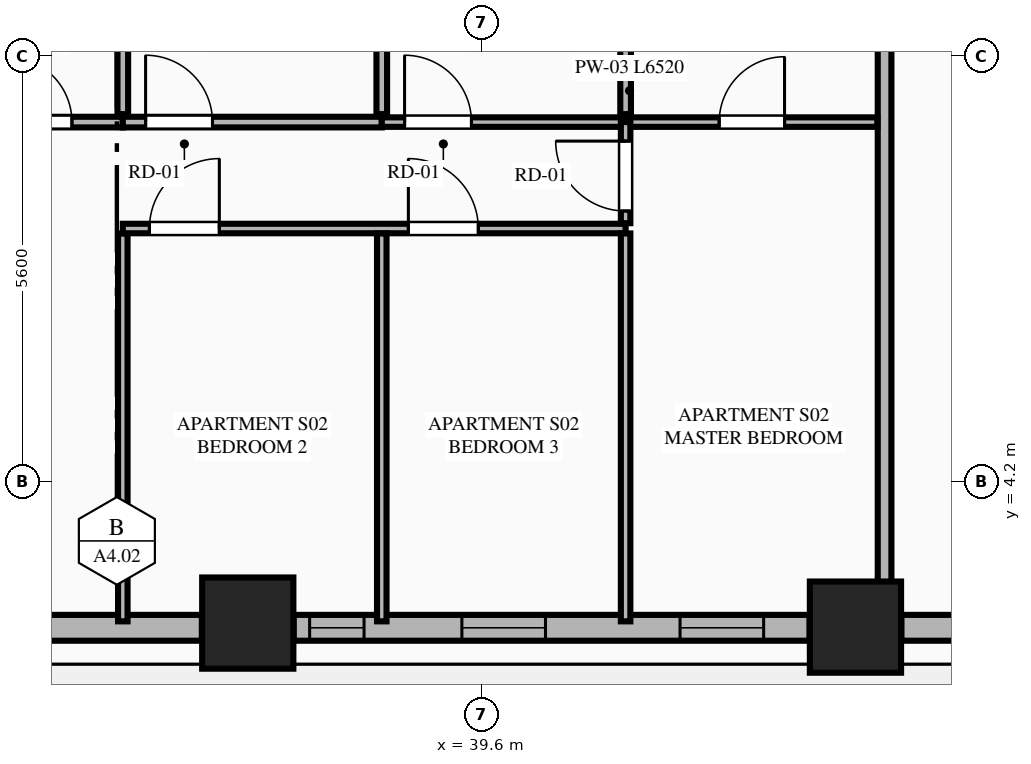
"""IFC4 building model, lengths in metres.
Left out: names, types, materials, properties, quantities, classifications, styles, units other than length and angle.
Written with IfcOpenShell. Run it as: python <this file> out.ifc"""

import sys

from ifc_helpers import new_model, si_unit, direction, frame, frame_2d, origin, origin_2d, place, context, subcontext, project, spatial, rectangle, extrude, element, fill, save


model = new_model("IFC4")
c1 = context("Model", 3, precision=1e-05, world=origin(), true_north=direction((0.0, 1.0)))
c2 = subcontext(c1, "Body", "Model", "MODEL_VIEW")
j1 = project(units=[si_unit("LENGTHUNIT", "METRE"), si_unit("PLANEANGLEUNIT", "RADIAN")], contexts=[c1])
p1 = place(None, origin())
s1 = spatial("IfcSite", under=j1, at=p1, CompositionType="ELEMENT")
p2 = place(p1, origin())
s2 = spatial("IfcBuilding", under=s1, at=p2, CompositionType="ELEMENT")
p3 = place(p2, frame((0.0, 0.0, 28.45)))
s3 = spatial("IfcBuildingStorey", under=s2, at=p3, CompositionType="ELEMENT", Elevation=28.45)
for number, where, z_axis, x_axis in (
    (1, (36.522, 2.342, 0.0), (0.0, 0.0, 1.0), (1.0, 0.0, 0.0)),
    (2, (44.517, 2.289, 0.0), (0.0, 0.0, 1.0), (1.0, 0.0, 0.0)),
):
    element("IfcColumn", number, at=place(p3, frame(where, z_axis=z_axis, x_axis=x_axis)), inside=s3, PredefinedType="COLUMN", context=c2, shape_type="SweptSolid", body=[
        extrude(rectangle(XDim=1.2, YDim=1.2, at=origin_2d()), origin(), (0.0, 0.0, 1.0), 3.55),
    ])
p4 = place(p3, frame((28.882, 2.28, 0.0), z_axis=(0.0, 0.0, 1.0), x_axis=(1.0, 0.0, 0.0)))
e3 = element("IfcWall", 3, at=p4, inside=s3, PredefinedType="STANDARD", context=c2, shape_type="SweptSolid", body=[
    extrude(rectangle(XDim=7.036, YDim=0.34, at=frame_2d((3.518, 0.0))), origin(), (0.0, 0.0, 1.0), 2.787),
])
p5 = place(p4, frame((2.397, 0.0, 0.0)))
e4 = element("IfcOpeningElement", 4, at=p5, cuts=e3, PredefinedType="OPENING", context=c2, shape_type="SweptSolid", body=[
    extrude(rectangle(XDim=1.1, YDim=2.25, at=frame_2d((0.55, 1.125))), frame((0.0, 0.18, 0.0), z_axis=(0.0, -1.0, 0.0), x_axis=(1.0, 0.0, 0.0)), (0.0, 0.0, 1.0), 0.36),
])
p6 = place(p3, frame((37.126, 2.28, 0.0), z_axis=(0.0, 0.0, 1.0), x_axis=(1.0, 0.0, 0.0)))
e5 = element("IfcWall", 5, at=p6, inside=s3, PredefinedType="STANDARD", context=c2, shape_type="SweptSolid", body=[
    extrude(rectangle(XDim=6.787, YDim=0.34, at=frame_2d((3.394, 0.0))), origin(), (0.0, 0.0, 1.0), 2.787),
])
p7 = place(p6, frame((2.213, 0.0, 0.75)))
e6 = element("IfcOpeningElement", 6, at=p7, cuts=e5, PredefinedType="OPENING", context=c2, shape_type="SweptSolid", body=[
    extrude(rectangle(XDim=1.1, YDim=1.887, at=frame_2d((0.55, 0.943))), frame((0.0, 0.18, 0.0), z_axis=(0.0, -1.0, 0.0), x_axis=(1.0, 0.0, 0.0)), (0.0, 0.0, 1.0), 0.36),
])
p8 = place(p6, frame((5.083, 0.0, 0.75)))
e7 = element("IfcOpeningElement", 7, at=p8, cuts=e5, PredefinedType="OPENING", context=c2, shape_type="SweptSolid", body=[
    extrude(rectangle(XDim=1.1, YDim=1.887, at=frame_2d((0.55, 0.943))), frame((0.0, 0.18, 0.0), z_axis=(0.0, -1.0, 0.0), x_axis=(1.0, 0.0, 0.0)), (0.0, 0.0, 1.0), 0.36),
])
p9 = place(p6, frame((0.21, 0.0, 0.75)))
e8 = element("IfcOpeningElement", 8, at=p9, cuts=e5, PredefinedType="OPENING", context=c2, shape_type="SweptSolid", body=[
    extrude(rectangle(XDim=0.716, YDim=1.887, at=frame_2d((0.358, 0.943))), frame((0.0, 0.18, 0.0), z_axis=(0.0, -1.0, 0.0), x_axis=(1.0, 0.0, 0.0)), (0.0, 0.0, 1.0), 0.36),
])
p10 = place(p3, frame((45.121, 2.28, 0.0), z_axis=(0.0, 0.0, 1.0), x_axis=(1.0, 0.0, 0.0)))
e9 = element("IfcWall", 9, at=p10, inside=s3, PredefinedType="STANDARD", context=c2, shape_type="SweptSolid", body=[
    extrude(rectangle(XDim=1.245, YDim=0.34, at=frame_2d((0.623, 0.0))), origin(), (0.0, 0.0, 1.0), 3.33),
])
p11 = place(p3, frame((44.9, 2.455, 0.0), z_axis=(0.0, 0.0, 1.0), x_axis=(0.0, 1.0, 0.0)))
e10 = element("IfcWall", 10, at=p11, inside=s3, PredefinedType="PARTITIONING", context=c2, shape_type="SweptSolid", body=[
    extrude(rectangle(XDim=13.495, YDim=0.18, at=frame_2d((6.748, 0.0))), origin(), (0.0, 0.0, 1.0), 3.33),
])
p12 = place(p3, frame((30.278, 8.933, 0.0), z_axis=(0.0, 0.0, 1.0), x_axis=(1.0, 0.0, 0.0)))
e11 = element("IfcWall", 11, at=p12, inside=s3, PredefinedType="PLUMBINGWALL", context=c2, shape_type="SweptSolid", body=[
    extrude(rectangle(XDim=4.6, YDim=0.14, at=frame_2d((2.3, 0.0))), origin(), (0.0, 0.0, 1.0), 3.33),
])
p13 = place(p12, frame((3.071, 0.0, 0.0)))
e12 = element("IfcOpeningElement", 12, at=p13, cuts=e11, PredefinedType="OPENING", context=c2, shape_type="SweptSolid", body=[
    extrude(rectangle(XDim=0.86, YDim=2.1, at=frame_2d((0.43, 1.05))), frame((0.0, 0.08, 0.0), z_axis=(0.0, -1.0, 0.0), x_axis=(1.0, 0.0, 0.0)), (0.0, 0.0, 1.0), 0.16),
])
p14 = place(p12, frame((0.26, 0.0, 0.0)))
e13 = element("IfcOpeningElement", 13, at=p14, cuts=e11, PredefinedType="OPENING", context=c2, shape_type="SweptSolid", body=[
    extrude(rectangle(XDim=0.88, YDim=2.15, at=frame_2d((0.44, 1.075))), frame((0.0, 0.08, 0.0), z_axis=(0.0, -1.0, 0.0), x_axis=(1.0, 0.0, 0.0)), (0.0, 0.0, 1.0), 0.16),
])
p15 = place(p3, frame((34.878, 8.933, 0.0), z_axis=(0.0, 0.0, 1.0), x_axis=(1.0, 0.0, 0.0)))
e14 = element("IfcWall", 14, at=p15, inside=s3, PredefinedType="PLUMBINGWALL", context=c2, shape_type="SweptSolid", body=[
    extrude(rectangle(XDim=3.407, YDim=0.14, at=frame_2d((1.704, 0.0))), origin(), (0.0, 0.0, 1.0), 3.33),
])
p16 = place(p15, frame((0.3, 0.0, 0.0)))
e15 = element("IfcOpeningElement", 15, at=p16, cuts=e14, PredefinedType="OPENING", context=c2, shape_type="SweptSolid", body=[
    extrude(rectangle(XDim=0.88, YDim=2.15, at=frame_2d((0.44, 1.075))), frame((0.0, 0.08, 0.0), z_axis=(0.0, -1.0, 0.0), x_axis=(1.0, 0.0, 0.0)), (0.0, 0.0, 1.0), 0.16),
])
p17 = place(p3, frame((38.285, 8.933, 0.0), z_axis=(0.0, 0.0, 1.0), x_axis=(1.0, 0.0, 0.0)))
e16 = element("IfcWall", 16, at=p17, inside=s3, PredefinedType="PARTITIONING", context=c2, shape_type="SweptSolid", body=[
    extrude(rectangle(XDim=6.52, YDim=0.125, at=frame_2d((3.26, 0.0))), origin(), (0.0, 0.0, 1.0), 3.33),
])
p18 = place(p17, frame((4.439, 0.0, 0.0)))
e17 = element("IfcOpeningElement", 17, at=p18, cuts=e16, PredefinedType="OPENING", context=c2, shape_type="SweptSolid", body=[
    extrude(rectangle(XDim=0.86, YDim=2.1, at=frame_2d((0.43, 1.05))), frame((0.0, 0.073, 0.0), z_axis=(0.0, -1.0, 0.0), x_axis=(1.0, 0.0, 0.0)), (0.0, 0.0, 1.0), 0.145),
])
p19 = place(p17, frame((0.3, 0.0, 0.0)))
e18 = element("IfcOpeningElement", 18, at=p19, cuts=e16, PredefinedType="OPENING", context=c2, shape_type="SweptSolid", body=[
    extrude(rectangle(XDim=0.88, YDim=2.15, at=frame_2d((0.44, 1.075))), frame((0.0, 0.073, 0.0), z_axis=(0.0, -1.0, 0.0), x_axis=(1.0, 0.0, 0.0)), (0.0, 0.0, 1.0), 0.145),
])
p20 = place(p3, frame((34.878, 2.365, 0.0), z_axis=(0.0, 0.0, 1.0), x_axis=(0.0, 1.0, 0.0)))
e19 = element("IfcWall", 19, at=p20, inside=s3, PredefinedType="PARTITIONING", context=c2, shape_type="SweptSolid", body=[
    extrude(rectangle(XDim=5.103, YDim=0.125, at=frame_2d((2.552, 0.0))), origin(), (0.0, 0.0, 1.0), 3.33),
])
p21 = place(p3, frame((34.878, 7.533, 0.0), z_axis=(0.0, 0.0, 1.0), x_axis=(1.0, 0.0, 0.0)))
e20 = element("IfcWall", 20, at=p21, inside=s3, PredefinedType="PARTITIONING", context=c2, shape_type="SweptSolid", body=[
    extrude(rectangle(XDim=6.615, YDim=0.125, at=frame_2d((3.308, 0.0))), origin(), (0.0, 0.0, 1.0), 3.33),
])
p22 = place(p21, frame((0.35, 0.0, 0.0)))
e21 = element("IfcOpeningElement", 21, at=p22, cuts=e20, PredefinedType="OPENING", context=c2, shape_type="SweptSolid", body=[
    extrude(rectangle(XDim=0.92, YDim=2.15, at=frame_2d((0.46, 1.075))), frame((0.0, 0.073, 0.0), z_axis=(0.0, -1.0, 0.0), x_axis=(1.0, 0.0, 0.0)), (0.0, 0.0, 1.0), 0.145),
])
p23 = place(p21, frame((3.757, 0.0, 0.0)))
e22 = element("IfcOpeningElement", 22, at=p23, cuts=e20, PredefinedType="OPENING", context=c2, shape_type="SweptSolid", body=[
    extrude(rectangle(XDim=0.92, YDim=2.15, at=frame_2d((0.46, 1.075))), frame((0.0, 0.073, 0.0), z_axis=(0.0, -1.0, 0.0), x_axis=(1.0, 0.0, 0.0)), (0.0, 0.0, 1.0), 0.145),
])
p24 = place(p3, frame((41.493, 7.603, 0.0), z_axis=(0.0, 0.0, 1.0), x_axis=(0.0, 1.0, 0.0)))
e23 = element("IfcWall", 23, at=p24, inside=s3, PredefinedType="PARTITIONING", context=c2, shape_type="SweptSolid", body=[
    extrude(rectangle(XDim=1.33, YDim=0.125, at=frame_2d((0.665, 0.0))), origin(), (0.0, 0.0, 1.0), 3.33),
])
p25 = place(p24, frame((0.16, 0.0, 0.0)))
e24 = element("IfcOpeningElement", 24, at=p25, cuts=e23, PredefinedType="OPENING", context=c2, shape_type="SweptSolid", body=[
    extrude(rectangle(XDim=0.92, YDim=2.15, at=frame_2d((0.46, 1.075))), frame((0.0, 0.073, 0.0), z_axis=(0.0, -1.0, 0.0), x_axis=(1.0, 0.0, 0.0)), (0.0, 0.0, 1.0), 0.145),
])
for number, where, z_axis, x_axis in (
    (25, (34.878, 9.038, 0.0), (0.0, 0.0, 1.0), (0.0, 1.0, 0.0)),
    (26, (38.285, 9.038, 0.0), (0.0, 0.0, 1.0), (0.0, 1.0, 0.0)),
):
    element("IfcWall", number, at=place(p3, frame(where, z_axis=z_axis, x_axis=x_axis)), inside=s3, PredefinedType="PLUMBINGWALL", context=c2, shape_type="SweptSolid", body=[
        extrude(rectangle(XDim=6.827, YDim=0.14, at=frame_2d((3.414, 0.0))), origin(), (0.0, 0.0, 1.0), 3.33),
    ])
for number, where, z_axis, x_axis in (
    (27, (38.285, 2.365, 0.0), (0.0, 0.0, 1.0), (0.0, 1.0, 0.0)),
    (28, (41.493, 2.365, 0.0), (0.0, 0.0, 1.0), (0.0, 1.0, 0.0)),
):
    element("IfcWall", number, at=place(p3, frame(where, z_axis=z_axis, x_axis=x_axis)), inside=s3, PredefinedType="PARTITIONING", context=c2, shape_type="SweptSolid", body=[
        extrude(rectangle(XDim=5.103, YDim=0.125, at=frame_2d((2.552, 0.0))), origin(), (0.0, 0.0, 1.0), 3.33),
    ])
p26 = place(p3, frame((41.493, 9.038, 0.0), z_axis=(0.0, 0.0, 1.0), x_axis=(0.0, 1.0, 0.0)))
e29 = element("IfcWall", 29, at=p26, inside=s3, PredefinedType="PLUMBINGWALL", context=c2, shape_type="SweptSolid", body=[
    extrude(rectangle(XDim=6.827, YDim=0.14, at=frame_2d((3.414, 0.0))), origin(), (0.0, 0.0, 1.0), 3.33),
])
p27 = place(p7, origin())
e30 = element("IfcWindow", 30, at=p27, inside=s3, PartitioningType="SINGLE_PANEL", PredefinedType="WINDOW", context=c2, shape_type="SweptSolid", body=[
    extrude(rectangle(XDim=1.1, YDim=1.887, at=frame_2d((0.55, 0.943))), frame((0.0, 0.03, 0.0), z_axis=(0.0, -1.0, 0.0), x_axis=(1.0, 0.0, 0.0)), (0.0, 0.0, 1.0), 0.06),
])
fill(e6, e30)
p28 = place(p13, origin())
e31 = element("IfcDoor", 31, at=p28, inside=s3, OperationType="SINGLE_SWING_LEFT", PredefinedType="DOOR", context=c2, shape_type="SweptSolid", body=[
    extrude(rectangle(XDim=0.86, YDim=2.1, at=frame_2d((0.43, 1.05))), frame((0.0, 0.025, 0.0), z_axis=(0.0, -1.0, 0.0), x_axis=(1.0, 0.0, 0.0)), (0.0, 0.0, 1.0), 0.05),
])
fill(e12, e31)
p29 = place(p18, origin())
e32 = element("IfcDoor", 32, at=p29, inside=s3, OperationType="SINGLE_SWING_RIGHT", PredefinedType="DOOR", context=c2, shape_type="SweptSolid", body=[
    extrude(rectangle(XDim=0.86, YDim=2.1, at=frame_2d((0.43, 1.05))), frame((0.0, 0.025, 0.0), z_axis=(0.0, -1.0, 0.0), x_axis=(1.0, 0.0, 0.0)), (0.0, 0.0, 1.0), 0.05),
])
fill(e17, e32)
p30 = place(p16, origin())
e33 = element("IfcDoor", 33, at=p30, inside=s3, OperationType="SINGLE_SWING_LEFT", PredefinedType="DOOR", context=c2, shape_type="SweptSolid", body=[
    extrude(rectangle(XDim=0.88, YDim=2.15, at=frame_2d((0.44, 1.075))), frame((0.0, 0.025, 0.0), z_axis=(0.0, -1.0, 0.0), x_axis=(1.0, 0.0, 0.0)), (0.0, 0.0, 1.0), 0.05),
])
fill(e15, e33)
p31 = place(p22, origin())
e34 = element("IfcDoor", 34, at=p31, inside=s3, OperationType="SINGLE_SWING_RIGHT", PredefinedType="DOOR", context=c2, shape_type="SweptSolid", body=[
    extrude(rectangle(XDim=0.92, YDim=2.15, at=frame_2d((0.46, 1.075))), frame((0.0, 0.025, 0.0), z_axis=(0.0, -1.0, 0.0), x_axis=(1.0, 0.0, 0.0)), (0.0, 0.0, 1.0), 0.05),
])
fill(e21, e34)
p32 = place(p23, origin())
e35 = element("IfcDoor", 35, at=p32, inside=s3, OperationType="SINGLE_SWING_LEFT", PredefinedType="DOOR", context=c2, shape_type="SweptSolid", body=[
    extrude(rectangle(XDim=0.92, YDim=2.15, at=frame_2d((0.46, 1.075))), frame((0.0, 0.025, 0.0), z_axis=(0.0, -1.0, 0.0), x_axis=(1.0, 0.0, 0.0)), (0.0, 0.0, 1.0), 0.05),
])
fill(e22, e35)
p33 = place(p25, origin())
e36 = element("IfcDoor", 36, at=p33, inside=s3, OperationType="SINGLE_SWING_RIGHT", PredefinedType="DOOR", context=c2, shape_type="SweptSolid", body=[
    extrude(rectangle(XDim=0.92, YDim=2.15, at=frame_2d((0.46, 1.075))), frame((0.0, 0.025, 0.0), z_axis=(0.0, -1.0, 0.0), x_axis=(1.0, 0.0, 0.0)), (0.0, 0.0, 1.0), 0.05),
])
fill(e24, e36)
p34 = place(p19, origin())
e37 = element("IfcDoor", 37, at=p34, inside=s3, OperationType="SINGLE_SWING_LEFT", PredefinedType="DOOR", context=c2, shape_type="SweptSolid", body=[
    extrude(rectangle(XDim=0.88, YDim=2.15, at=frame_2d((0.44, 1.075))), frame((0.0, 0.025, 0.0), z_axis=(0.0, -1.0, 0.0), x_axis=(1.0, 0.0, 0.0)), (0.0, 0.0, 1.0), 0.05),
])
fill(e18, e37)
p35 = place(p8, origin())
e38 = element("IfcWindow", 38, at=p35, inside=s3, PartitioningType="SINGLE_PANEL", PredefinedType="WINDOW", context=c2, shape_type="SweptSolid", body=[
    extrude(rectangle(XDim=1.1, YDim=1.887, at=frame_2d((0.55, 0.943))), frame((0.0, 0.03, 0.0), z_axis=(0.0, -1.0, 0.0), x_axis=(1.0, 0.0, 0.0)), (0.0, 0.0, 1.0), 0.06),
])
fill(e7, e38)
p36 = place(p9, origin())
e39 = element("IfcWindow", 39, at=p36, inside=s3, PartitioningType="SINGLE_PANEL", PredefinedType="WINDOW", context=c2, shape_type="SweptSolid", body=[
    extrude(rectangle(XDim=0.716, YDim=1.887, at=frame_2d((0.358, 0.943))), frame((0.0, 0.03, 0.0), z_axis=(0.0, -1.0, 0.0), x_axis=(1.0, 0.0, 0.0)), (0.0, 0.0, 1.0), 0.06),
])
fill(e8, e39)
save(model, sys.argv[1])
